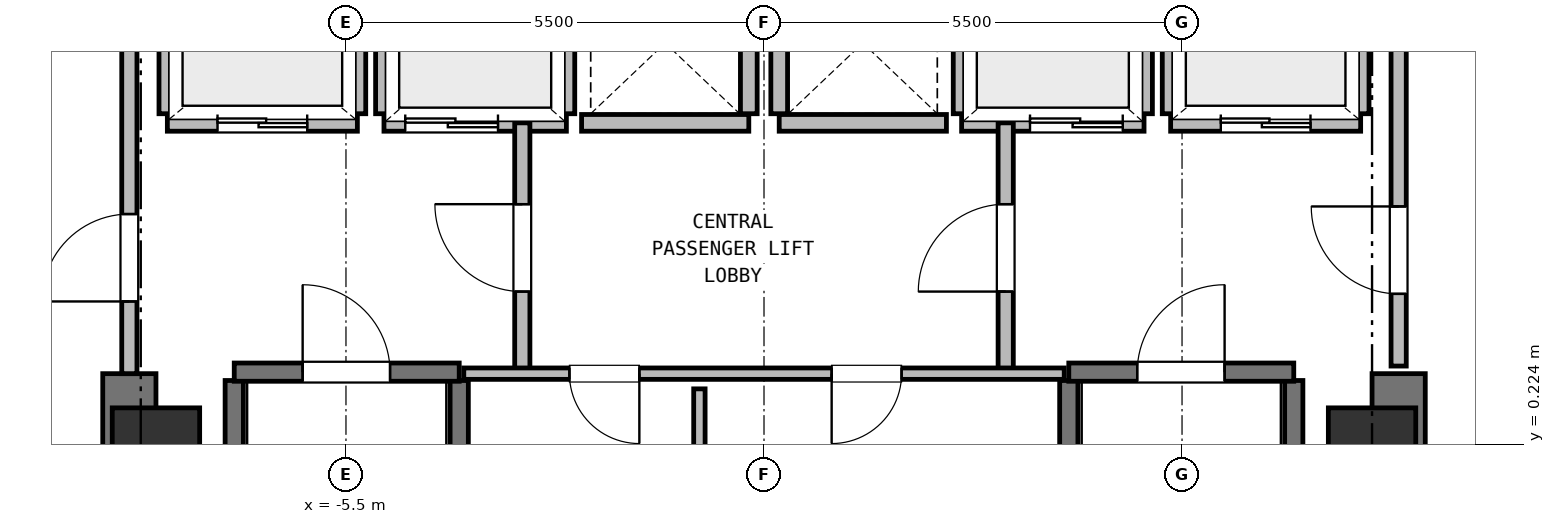
"""IFC4 building model, lengths in metres.
Left out: names, types, materials, properties, quantities, classifications, styles, units other than length and angle.
Written with IfcOpenShell. Run it as: python <this file> out.ifc"""

import sys

from ifc_helpers import new_model, si_unit, direction, frame, frame_2d, origin, origin_2d, place, context, subcontext, project, spatial, rectangle, extrude, element, fill, save


model = new_model("IFC4")
c1 = context("Model", 3, precision=1e-05, world=origin(), true_north=direction((0.0, 1.0)))
c2 = subcontext(c1, "Body", "Model", "MODEL_VIEW")
j1 = project(units=[si_unit("LENGTHUNIT", "METRE"), si_unit("PLANEANGLEUNIT", "RADIAN")], contexts=[c1])
p1 = place(None, origin())
s1 = spatial("IfcSite", under=j1, at=p1, CompositionType="ELEMENT")
p2 = place(p1, origin())
s2 = spatial("IfcBuilding", under=s1, at=p2, CompositionType="ELEMENT")
p3 = place(p2, frame((0.0, 0.0, 71.75)))
s3 = spatial("IfcBuildingStorey", under=s2, at=p3, CompositionType="ELEMENT", Elevation=71.75)
for number, where, z_axis, x_axis in (
    (1, (8.0, 0.0, 0.0), (0.0, 0.0, 1.0), (1.0, 0.0, 0.0)),
    (2, (-8.0, 0.0, 0.0), (0.0, 0.0, 1.0), (1.0, 0.0, 0.0)),
):
    element("IfcColumn", number, at=place(p3, frame(where, z_axis=z_axis, x_axis=x_axis)), inside=s3, PredefinedType="COLUMN", context=c2, shape_type="SweptSolid", body=[
        extrude(rectangle(XDim=1.15, YDim=1.4, at=origin_2d()), origin(), (0.0, 0.0, 1.0), 3.75),
    ])
for number, where, z_axis, x_axis in (
    (3, (-8.35, -6.95, 0.0), (0.0, 0.0, 1.0), (0.0, 1.0, 0.0)),
    (4, (8.35, -6.95, 0.0), (0.0, 0.0, 1.0), (0.0, 1.0, 0.0)),
):
    element("IfcWall", number, at=place(p3, frame(where, z_axis=z_axis, x_axis=x_axis)), inside=s3, PredefinedType="SHEAR", context=c2, shape_type="SweptSolid", body=[
        extrude(rectangle(XDim=8.1, YDim=0.7, at=frame_2d((4.05, 0.0))), origin(), (0.0, 0.0, 1.0), 3.5),
    ])
for number, where, z_axis, x_axis in (
    (5, (-6.97, -6.16, 0.0), (0.0, 0.0, 1.0), (0.0, 1.0, 0.0)),
    (6, (-4.01, -6.16, 0.0), (0.0, 0.0, 1.0), (0.0, 1.0, 0.0)),
):
    element("IfcWall", number, at=place(p3, frame(where, z_axis=z_axis, x_axis=x_axis)), inside=s3, PredefinedType="SHEAR", context=c2, shape_type="SweptSolid", body=[
        extrude(rectangle(XDim=7.22, YDim=0.24, at=frame_2d((3.61, 0.0))), origin(), (0.0, 0.0, 1.0), 3.5),
    ])
p4 = place(p3, frame((-6.97, 1.17, 0.0), z_axis=(0.0, 0.0, 1.0), x_axis=(1.0, 0.0, 0.0)))
e7 = element("IfcWall", 7, at=p4, inside=s3, PredefinedType="SHEAR", context=c2, shape_type="SweptSolid", body=[
    extrude(rectangle(XDim=2.96, YDim=0.24, at=frame_2d((1.48, 0.0))), origin(), (0.0, 0.0, 1.0), 3.5),
])
p5 = place(p4, frame((0.9, 0.0, 0.0)))
e8 = element("IfcOpeningElement", 8, at=p5, cuts=e7, PredefinedType="OPENING", context=c2, shape_type="SweptSolid", body=[
    extrude(rectangle(XDim=1.15, YDim=2.15, at=frame_2d((0.575, 1.075))), frame((0.0, 0.13, 0.0), z_axis=(0.0, -1.0, 0.0), x_axis=(1.0, 0.0, 0.0)), (0.0, 0.0, 1.0), 0.26),
])
for number, where, z_axis, x_axis in (
    (9, (4.01, -6.16, 0.0), (0.0, 0.0, 1.0), (0.0, 1.0, 0.0)),
    (10, (6.97, -6.16, 0.0), (0.0, 0.0, 1.0), (0.0, 1.0, 0.0)),
):
    element("IfcWall", number, at=place(p3, frame(where, z_axis=z_axis, x_axis=x_axis)), inside=s3, PredefinedType="SHEAR", context=c2, shape_type="SweptSolid", body=[
        extrude(rectangle(XDim=7.22, YDim=0.24, at=frame_2d((3.61, 0.0))), origin(), (0.0, 0.0, 1.0), 3.5),
    ])
p6 = place(p3, frame((4.01, 1.17, 0.0), z_axis=(0.0, 0.0, 1.0), x_axis=(1.0, 0.0, 0.0)))
e11 = element("IfcWall", 11, at=p6, inside=s3, PredefinedType="SHEAR", context=c2, shape_type="SweptSolid", body=[
    extrude(rectangle(XDim=2.96, YDim=0.24, at=frame_2d((1.48, 0.0))), origin(), (0.0, 0.0, 1.0), 3.5),
])
p7 = place(p6, frame((0.9, 0.0, 0.0)))
e12 = element("IfcOpeningElement", 12, at=p7, cuts=e11, PredefinedType="OPENING", context=c2, shape_type="SweptSolid", body=[
    extrude(rectangle(XDim=1.15, YDim=2.15, at=frame_2d((0.575, 1.075))), frame((0.0, 0.13, 0.0), z_axis=(0.0, -1.0, 0.0), x_axis=(1.0, 0.0, 0.0)), (0.0, 0.0, 1.0), 0.26),
])
p8 = place(p3, frame((-7.85, 4.45, 0.0), z_axis=(0.0, 0.0, 1.0), x_axis=(1.0, 0.0, 0.0)))
e13 = element("IfcWall", 13, at=p8, inside=s3, PredefinedType="PARTITIONING", context=c2, shape_type="SweptSolid", body=[
    extrude(rectangle(XDim=2.5, YDim=0.22, at=frame_2d((1.25, 0.0))), origin(), (0.0, 0.0, 1.0), 3.5),
])
p9 = place(p8, frame((0.66, 0.0, 0.0)))
e14 = element("IfcOpeningElement", 14, at=p9, cuts=e13, PredefinedType="OPENING", context=c2, shape_type="SweptSolid", body=[
    extrude(rectangle(XDim=1.18, YDim=2.15, at=frame_2d((0.59, 1.075))), frame((0.0, 0.12, 0.0), z_axis=(0.0, -1.0, 0.0), x_axis=(1.0, 0.0, 0.0)), (0.0, 0.0, 1.0), 0.24),
])
p10 = place(p3, frame((-7.85, 4.57, 0.0), z_axis=(0.0, 0.0, 1.0), x_axis=(0.0, 1.0, 0.0)))
e15 = element("IfcWall", 15, at=p10, inside=s3, PredefinedType="PARTITIONING", context=c2, shape_type="SweptSolid", body=[
    extrude(rectangle(XDim=2.03, YDim=0.22, at=frame_2d((1.015, 0.0))), origin(), (0.0, 0.0, 1.0), 3.08),
])
p11 = place(p3, frame((-5.35, 4.57, 0.0), z_axis=(0.0, 0.0, 1.0), x_axis=(0.0, 1.0, 0.0)))
e16 = element("IfcWall", 16, at=p11, inside=s3, PredefinedType="PARTITIONING", context=c2, shape_type="SweptSolid", body=[
    extrude(rectangle(XDim=2.03, YDim=0.22, at=frame_2d((1.015, 0.0))), origin(), (0.0, 0.0, 1.0), 3.5),
])
p12 = place(p3, frame((5.35, 4.45, 0.0), z_axis=(0.0, 0.0, 1.0), x_axis=(1.0, 0.0, 0.0)))
e17 = element("IfcWall", 17, at=p12, inside=s3, PredefinedType="PARTITIONING", context=c2, shape_type="SweptSolid", body=[
    extrude(rectangle(XDim=2.5, YDim=0.22, at=frame_2d((1.25, 0.0))), origin(), (0.0, 0.0, 1.0), 3.5),
])
p13 = place(p12, frame((0.66, 0.0, 0.0)))
e18 = element("IfcOpeningElement", 18, at=p13, cuts=e17, PredefinedType="OPENING", context=c2, shape_type="SweptSolid", body=[
    extrude(rectangle(XDim=1.18, YDim=2.15, at=frame_2d((0.59, 1.075))), frame((0.0, 0.12, 0.0), z_axis=(0.0, -1.0, 0.0), x_axis=(1.0, 0.0, 0.0)), (0.0, 0.0, 1.0), 0.24),
])
p14 = place(p3, frame((5.35, 4.57, 0.0), z_axis=(0.0, 0.0, 1.0), x_axis=(0.0, 1.0, 0.0)))
e19 = element("IfcWall", 19, at=p14, inside=s3, PredefinedType="PARTITIONING", context=c2, shape_type="SweptSolid", body=[
    extrude(rectangle(XDim=2.03, YDim=0.22, at=frame_2d((1.015, 0.0))), origin(), (0.0, 0.0, 1.0), 3.5),
])
p15 = place(p3, frame((7.85, 4.57, 0.0), z_axis=(0.0, 0.0, 1.0), x_axis=(0.0, 1.0, 0.0)))
e20 = element("IfcWall", 20, at=p15, inside=s3, PredefinedType="PARTITIONING", context=c2, shape_type="SweptSolid", body=[
    extrude(rectangle(XDim=2.03, YDim=0.22, at=frame_2d((1.015, 0.0))), origin(), (0.0, 0.0, 1.0), 3.08),
])
p16 = place(p3, frame((-5.0, 4.45, 0.0), z_axis=(0.0, 0.0, 1.0), x_axis=(1.0, 0.0, 0.0)))
e21 = element("IfcWall", 21, at=p16, inside=s3, PredefinedType="PARTITIONING", context=c2, shape_type="SweptSolid", body=[
    extrude(rectangle(XDim=2.4, YDim=0.22, at=frame_2d((1.2, 0.0))), origin(), (0.0, 0.0, 1.0), 3.5),
])
p17 = place(p16, frame((0.28, 0.0, 0.0)))
e22 = element("IfcOpeningElement", 22, at=p17, cuts=e21, PredefinedType="OPENING", context=c2, shape_type="SweptSolid", body=[
    extrude(rectangle(XDim=1.22, YDim=2.15, at=frame_2d((0.61, 1.075))), frame((0.0, 0.12, 0.0), z_axis=(0.0, -1.0, 0.0), x_axis=(1.0, 0.0, 0.0)), (0.0, 0.0, 1.0), 0.24),
])
for number, where, z_axis, x_axis in (
    (23, (-5.0, 4.57, 0.0), (0.0, 0.0, 1.0), (0.0, 1.0, 0.0)),
    (24, (-2.6, 4.57, 0.0), (0.0, 0.0, 1.0), (0.0, 1.0, 0.0)),
):
    element("IfcWall", number, at=place(p3, frame(where, z_axis=z_axis, x_axis=x_axis)), inside=s3, PredefinedType="PARTITIONING", context=c2, shape_type="SweptSolid", body=[
        extrude(rectangle(XDim=2.03, YDim=0.22, at=frame_2d((1.015, 0.0))), origin(), (0.0, 0.0, 1.0), 3.5),
    ])
p18 = place(p3, frame((2.6, 4.45, 0.0), z_axis=(0.0, 0.0, 1.0), x_axis=(1.0, 0.0, 0.0)))
e25 = element("IfcWall", 25, at=p18, inside=s3, PredefinedType="PARTITIONING", context=c2, shape_type="SweptSolid", body=[
    extrude(rectangle(XDim=2.4, YDim=0.22, at=frame_2d((1.2, 0.0))), origin(), (0.0, 0.0, 1.0), 3.5),
])
p19 = place(p18, frame((0.9, 0.0, 0.0)))
e26 = element("IfcOpeningElement", 26, at=p19, cuts=e25, PredefinedType="OPENING", context=c2, shape_type="SweptSolid", body=[
    extrude(rectangle(XDim=1.22, YDim=2.15, at=frame_2d((0.61, 1.075))), frame((0.0, 0.12, 0.0), z_axis=(0.0, -1.0, 0.0), x_axis=(1.0, 0.0, 0.0)), (0.0, 0.0, 1.0), 0.24),
])
for number, where, z_axis, x_axis in (
    (27, (2.6, 4.57, 0.0), (0.0, 0.0, 1.0), (0.0, 1.0, 0.0)),
    (28, (5.0, 4.57, 0.0), (0.0, 0.0, 1.0), (0.0, 1.0, 0.0)),
):
    element("IfcWall", number, at=place(p3, frame(where, z_axis=z_axis, x_axis=x_axis)), inside=s3, PredefinedType="PARTITIONING", context=c2, shape_type="SweptSolid", body=[
        extrude(rectangle(XDim=2.03, YDim=0.22, at=frame_2d((1.015, 0.0))), origin(), (0.0, 0.0, 1.0), 3.5),
    ])
p20 = place(p3, frame((-2.4, 4.45, 0.0), z_axis=(0.0, 0.0, 1.0), x_axis=(1.0, 0.0, 0.0)))
e29 = element("IfcWall", 29, at=p20, inside=s3, PredefinedType="PARTITIONING", context=c2, shape_type="SweptSolid", body=[
    extrude(rectangle(XDim=2.2, YDim=0.22, at=frame_2d((1.1, 0.0))), origin(), (0.0, 0.0, 1.0), 3.5),
])
p21 = place(p3, frame((-0.2, 4.57, 0.0), z_axis=(0.0, 0.0, 1.0), x_axis=(0.0, 1.0, 0.0)))
e30 = element("IfcWall", 30, at=p21, inside=s3, PredefinedType="PARTITIONING", context=c2, shape_type="SweptSolid", body=[
    extrude(rectangle(XDim=2.03, YDim=0.22, at=frame_2d((1.015, 0.0))), origin(), (0.0, 0.0, 1.0), 3.5),
])
p22 = place(p3, frame((0.2, 4.45, 0.0), z_axis=(0.0, 0.0, 1.0), x_axis=(1.0, 0.0, 0.0)))
e31 = element("IfcWall", 31, at=p22, inside=s3, PredefinedType="PARTITIONING", context=c2, shape_type="SweptSolid", body=[
    extrude(rectangle(XDim=2.2, YDim=0.22, at=frame_2d((1.1, 0.0))), origin(), (0.0, 0.0, 1.0), 3.5),
])
p23 = place(p3, frame((0.2, 4.57, 0.0), z_axis=(0.0, 0.0, 1.0), x_axis=(0.0, 1.0, 0.0)))
e32 = element("IfcWall", 32, at=p23, inside=s3, PredefinedType="PARTITIONING", context=c2, shape_type="SweptSolid", body=[
    extrude(rectangle(XDim=2.03, YDim=0.22, at=frame_2d((1.015, 0.0))), origin(), (0.0, 0.0, 1.0), 3.5),
])
p24 = place(p3, frame((-3.18, 1.15, 0.0), z_axis=(0.0, 0.0, 1.0), x_axis=(0.0, 1.0, 0.0)))
e33 = element("IfcWall", 33, at=p24, inside=s3, PredefinedType="PARTITIONING", context=c2, shape_type="SweptSolid", body=[
    extrude(rectangle(XDim=3.3, YDim=0.2, at=frame_2d((1.65, 0.0))), origin(), (0.0, 0.0, 1.0), 3.5),
])
p25 = place(p24, frame((1.08, 0.0, 0.0)))
e34 = element("IfcOpeningElement", 34, at=p25, cuts=e33, PredefinedType="OPENING", context=c2, shape_type="SweptSolid", body=[
    extrude(rectangle(XDim=1.15, YDim=2.15, at=frame_2d((0.575, 1.075))), frame((0.0, 0.11, 0.0), z_axis=(0.0, -1.0, 0.0), x_axis=(1.0, 0.0, 0.0)), (0.0, 0.0, 1.0), 0.22),
])
p26 = place(p3, frame((3.18, 1.15, 0.0), z_axis=(0.0, 0.0, 1.0), x_axis=(0.0, 1.0, 0.0)))
e35 = element("IfcWall", 35, at=p26, inside=s3, PredefinedType="PARTITIONING", context=c2, shape_type="SweptSolid", body=[
    extrude(rectangle(XDim=3.3, YDim=0.2, at=frame_2d((1.65, 0.0))), origin(), (0.0, 0.0, 1.0), 3.5),
])
p27 = place(p26, frame((1.08, 0.0, 0.0)))
e36 = element("IfcOpeningElement", 36, at=p27, cuts=e35, PredefinedType="OPENING", context=c2, shape_type="SweptSolid", body=[
    extrude(rectangle(XDim=1.15, YDim=2.15, at=frame_2d((0.575, 1.075))), frame((0.0, 0.11, 0.0), z_axis=(0.0, -1.0, 0.0), x_axis=(1.0, 0.0, 0.0)), (0.0, 0.0, 1.0), 0.22),
])
p28 = place(p3, frame((-8.35, 1.15, 0.0), z_axis=(0.0, 0.0, 1.0), x_axis=(0.0, 1.0, 0.0)))
e37 = element("IfcWall", 37, at=p28, inside=s3, PredefinedType="PARTITIONING", context=c2, shape_type="SweptSolid", body=[
    extrude(rectangle(XDim=5.4, YDim=0.2, at=frame_2d((2.7, 0.0))), origin(), (0.0, 0.0, 1.0), 3.5),
])
p29 = place(p28, frame((0.95, 0.0, 0.0)))
e38 = element("IfcOpeningElement", 38, at=p29, cuts=e37, PredefinedType="OPENING", context=c2, shape_type="SweptSolid", body=[
    extrude(rectangle(XDim=1.15, YDim=2.15, at=frame_2d((0.575, 1.075))), frame((0.0, 0.11, 0.0), z_axis=(0.0, -1.0, 0.0), x_axis=(1.0, 0.0, 0.0)), (0.0, 0.0, 1.0), 0.22),
])
p30 = place(p3, frame((8.35, 1.25, 0.0), z_axis=(0.0, 0.0, 1.0), x_axis=(0.0, 1.0, 0.0)))
e39 = element("IfcWall", 39, at=p30, inside=s3, PredefinedType="PARTITIONING", context=c2, shape_type="SweptSolid", body=[
    extrude(rectangle(XDim=5.3, YDim=0.2, at=frame_2d((2.65, 0.0))), origin(), (0.0, 0.0, 1.0), 3.5),
])
p31 = place(p30, frame((0.95, 0.0, 0.0)))
e40 = element("IfcOpeningElement", 40, at=p31, cuts=e39, PredefinedType="OPENING", context=c2, shape_type="SweptSolid", body=[
    extrude(rectangle(XDim=1.15, YDim=2.15, at=frame_2d((0.575, 1.075))), frame((0.0, 0.11, 0.0), z_axis=(0.0, -1.0, 0.0), x_axis=(1.0, 0.0, 0.0)), (0.0, 0.0, 1.0), 0.22),
])
p32 = place(p3, frame((3.95, 1.15, 0.0), z_axis=(0.0, 0.0, 1.0), x_axis=(-1.0, 0.0, 0.0)))
e41 = element("IfcWall", 41, at=p32, inside=s3, PredefinedType="PARTITIONING", context=c2, shape_type="SweptSolid", body=[
    extrude(rectangle(XDim=7.9, YDim=0.15, at=frame_2d((3.95, 0.0))), origin(), (0.0, 0.0, 1.0), 3.5),
])
p33 = place(p32, frame((5.59, 0.0, 0.0)))
e42 = element("IfcOpeningElement", 42, at=p33, cuts=e41, PredefinedType="OPENING", context=c2, shape_type="SweptSolid", body=[
    extrude(rectangle(XDim=0.92, YDim=2.05, at=frame_2d((0.46, 1.025))), frame((0.0, 0.085, 0.0), z_axis=(0.0, -1.0, 0.0), x_axis=(1.0, 0.0, 0.0)), (0.0, 0.0, 1.0), 0.17),
])
p34 = place(p32, frame((2.14, 0.0, 0.0)))
e43 = element("IfcOpeningElement", 43, at=p34, cuts=e41, PredefinedType="OPENING", context=c2, shape_type="SweptSolid", body=[
    extrude(rectangle(XDim=0.92, YDim=2.05, at=frame_2d((0.46, 1.025))), frame((0.0, 0.085, 0.0), z_axis=(0.0, -1.0, 0.0), x_axis=(1.0, 0.0, 0.0)), (0.0, 0.0, 1.0), 0.17),
])
p35 = place(p3, frame((-0.85, -4.08, 0.0), z_axis=(0.0, 0.0, 1.0), x_axis=(0.0, 1.0, 0.0)))
e44 = element("IfcWall", 44, at=p35, inside=s3, PredefinedType="PARTITIONING", context=c2, shape_type="SweptSolid", body=[
    extrude(rectangle(XDim=5.03, YDim=0.15, at=frame_2d((2.515, 0.0))), origin(), (0.0, 0.0, 1.0), 3.5),
])
p36 = place(p5, origin())
e45 = element("IfcDoor", 45, at=p36, inside=s3, OperationType="SINGLE_SWING_LEFT", PredefinedType="DOOR", context=c2, shape_type="SweptSolid", body=[
    extrude(rectangle(XDim=1.15, YDim=2.15, at=frame_2d((0.575, 1.075))), frame((0.0, 0.025, 0.0), z_axis=(0.0, -1.0, 0.0), x_axis=(1.0, 0.0, 0.0)), (0.0, 0.0, 1.0), 0.05),
])
fill(e8, e45)
p37 = place(p7, origin())
e46 = element("IfcDoor", 46, at=p37, inside=s3, OperationType="SINGLE_SWING_RIGHT", PredefinedType="DOOR", context=c2, shape_type="SweptSolid", body=[
    extrude(rectangle(XDim=1.15, YDim=2.15, at=frame_2d((0.575, 1.075))), frame((0.0, 0.025, 0.0), z_axis=(0.0, -1.0, 0.0), x_axis=(1.0, 0.0, 0.0)), (0.0, 0.0, 1.0), 0.05),
])
fill(e12, e46)
p38 = place(p9, origin())
e47 = element("IfcDoor", 47, at=p38, inside=s3, OperationType="DOUBLE_DOOR_SLIDING", PredefinedType="DOOR", context=c2, shape_type="SweptSolid", body=[
    extrude(rectangle(XDim=1.18, YDim=2.15, at=frame_2d((0.59, 1.075))), frame((0.0, 0.025, 0.0), z_axis=(0.0, -1.0, 0.0), x_axis=(1.0, 0.0, 0.0)), (0.0, 0.0, 1.0), 0.05),
])
fill(e14, e47)
p39 = place(p13, origin())
e48 = element("IfcDoor", 48, at=p39, inside=s3, OperationType="DOUBLE_DOOR_SLIDING", PredefinedType="DOOR", context=c2, shape_type="SweptSolid", body=[
    extrude(rectangle(XDim=1.18, YDim=2.15, at=frame_2d((0.59, 1.075))), frame((0.0, 0.025, 0.0), z_axis=(0.0, -1.0, 0.0), x_axis=(1.0, 0.0, 0.0)), (0.0, 0.0, 1.0), 0.05),
])
fill(e18, e48)
p40 = place(p17, origin())
e49 = element("IfcDoor", 49, at=p40, inside=s3, OperationType="DOUBLE_DOOR_SLIDING", PredefinedType="DOOR", context=c2, shape_type="SweptSolid", body=[
    extrude(rectangle(XDim=1.22, YDim=2.15, at=frame_2d((0.61, 1.075))), frame((0.0, 0.025, 0.0), z_axis=(0.0, -1.0, 0.0), x_axis=(1.0, 0.0, 0.0)), (0.0, 0.0, 1.0), 0.05),
])
fill(e22, e49)
p41 = place(p19, origin())
e50 = element("IfcDoor", 50, at=p41, inside=s3, OperationType="DOUBLE_DOOR_SLIDING", PredefinedType="DOOR", context=c2, shape_type="SweptSolid", body=[
    extrude(rectangle(XDim=1.22, YDim=2.15, at=frame_2d((0.61, 1.075))), frame((0.0, 0.025, 0.0), z_axis=(0.0, -1.0, 0.0), x_axis=(1.0, 0.0, 0.0)), (0.0, 0.0, 1.0), 0.05),
])
fill(e26, e50)
p42 = place(p25, origin())
e51 = element("IfcDoor", 51, at=p42, inside=s3, OperationType="SINGLE_SWING_RIGHT", PredefinedType="DOOR", context=c2, shape_type="SweptSolid", body=[
    extrude(rectangle(XDim=1.15, YDim=2.15, at=frame_2d((0.575, 1.075))), frame((0.0, 0.025, 0.0), z_axis=(0.0, -1.0, 0.0), x_axis=(1.0, 0.0, 0.0)), (0.0, 0.0, 1.0), 0.05),
])
fill(e34, e51)
p43 = place(p27, origin())
e52 = element("IfcDoor", 52, at=p43, inside=s3, OperationType="SINGLE_SWING_LEFT", PredefinedType="DOOR", context=c2, shape_type="SweptSolid", body=[
    extrude(rectangle(XDim=1.15, YDim=2.15, at=frame_2d((0.575, 1.075))), frame((0.0, 0.025, 0.0), z_axis=(0.0, -1.0, 0.0), x_axis=(1.0, 0.0, 0.0)), (0.0, 0.0, 1.0), 0.05),
])
fill(e36, e52)
p44 = place(p29, origin())
e53 = element("IfcDoor", 53, at=p44, inside=s3, OperationType="SINGLE_SWING_LEFT", PredefinedType="DOOR", context=c2, shape_type="SweptSolid", body=[
    extrude(rectangle(XDim=1.15, YDim=2.15, at=frame_2d((0.575, 1.075))), frame((0.0, 0.025, 0.0), z_axis=(0.0, -1.0, 0.0), x_axis=(1.0, 0.0, 0.0)), (0.0, 0.0, 1.0), 0.05),
])
fill(e38, e53)
p45 = place(p31, origin())
e54 = element("IfcDoor", 54, at=p45, inside=s3, OperationType="SINGLE_SWING_RIGHT", PredefinedType="DOOR", context=c2, shape_type="SweptSolid", body=[
    extrude(rectangle(XDim=1.15, YDim=2.15, at=frame_2d((0.575, 1.075))), frame((0.0, 0.025, 0.0), z_axis=(0.0, -1.0, 0.0), x_axis=(1.0, 0.0, 0.0)), (0.0, 0.0, 1.0), 0.05),
])
fill(e40, e54)
p46 = place(p33, origin())
e55 = element("IfcDoor", 55, at=p46, inside=s3, OperationType="SINGLE_SWING_LEFT", PredefinedType="DOOR", context=c2, shape_type="SweptSolid", body=[
    extrude(rectangle(XDim=0.92, YDim=2.05, at=frame_2d((0.46, 1.025))), frame((0.0, 0.025, 0.0), z_axis=(0.0, -1.0, 0.0), x_axis=(1.0, 0.0, 0.0)), (0.0, 0.0, 1.0), 0.05),
])
fill(e42, e55)
p47 = place(p34, origin())
e56 = element("IfcDoor", 56, at=p47, inside=s3, OperationType="SINGLE_SWING_RIGHT", PredefinedType="DOOR", context=c2, shape_type="SweptSolid", body=[
    extrude(rectangle(XDim=0.92, YDim=2.05, at=frame_2d((0.46, 1.025))), frame((0.0, 0.025, 0.0), z_axis=(0.0, -1.0, 0.0), x_axis=(1.0, 0.0, 0.0)), (0.0, 0.0, 1.0), 0.05),
])
fill(e43, e56)
save(model, sys.argv[1])
